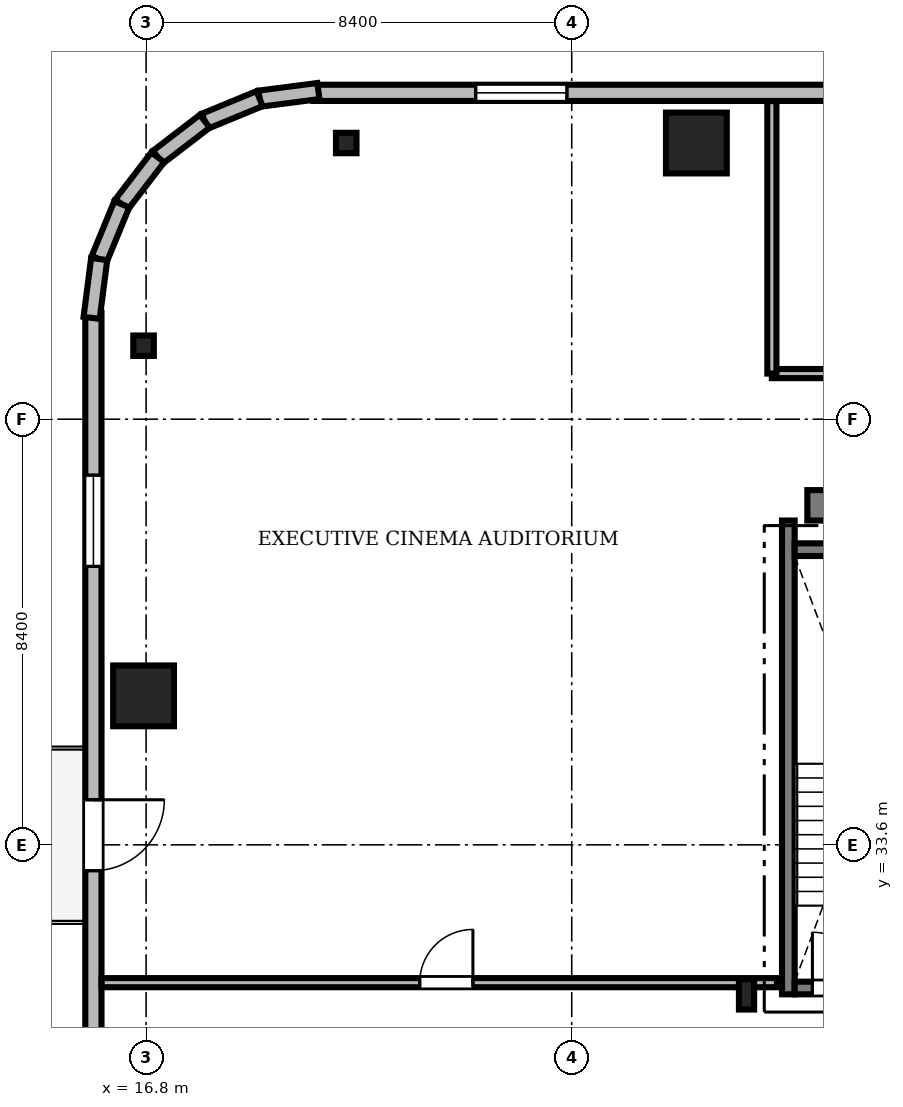
"""IFC4 building model, lengths in metres.
Left out: names, types, materials, properties, quantities, classifications, styles, units other than length and angle.
Written with IfcOpenShell. Run it as: python <this file> out.ifc"""

import sys

from ifc_helpers import new_model, si_unit, direction, frame, frame_2d, origin, origin_2d, place, context, subcontext, project, spatial, rectangle, i_section, extrude, source, transform, mapped, element, fill, save


model = new_model("IFC4")
c1 = context("Model", 3, precision=1e-05, world=origin(), true_north=direction((0.0, 1.0)))
c2 = subcontext(c1, "Body", "Model", "MODEL_VIEW")
j1 = project(units=[si_unit("LENGTHUNIT", "METRE"), si_unit("PLANEANGLEUNIT", "RADIAN")], contexts=[c1])
p1 = place(None, origin())
s1 = spatial("IfcSite", under=j1, at=p1, CompositionType="ELEMENT")
p2 = place(p1, origin())
s2 = spatial("IfcBuilding", under=s1, at=p2, CompositionType="ELEMENT")
p3 = place(p2, frame((0.0, 0.0, 250.6)))
s3 = spatial("IfcBuildingStorey", under=s2, at=p3, CompositionType="ELEMENT", Elevation=250.6)
m1 = source(origin(), c2, "Body", "SweptSolid", [
    extrude(rectangle(XDim=17.52, YDim=0.6, at=frame_2d((8.76, 0.0))), origin(), (0.0, 0.0, 1.0), 3.65),
])
p4 = place(p3, frame((29.85, 40.3, 0.0), z_axis=(0.0, 0.0, 1.0), x_axis=(1.0, 0.0, 0.0)))
e1 = element("IfcWall", 1, at=p4, inside=s3, PredefinedType="SHEAR", context=c2, shape_type="MappedRepresentation", body=[
    mapped(m1, transform((0.0, 0.0, 0.0), scale=1.0)),
])
m2 = source(origin(), c2, "Body", "SweptSolid", [
    extrude(i_section(OverallWidth=0.3, OverallDepth=0.6, WebThickness=0.015, FlangeThickness=0.03, FilletRadius=0.027, at=origin_2d()), origin(), (0.0, 0.0, 1.0), 3.65),
])
p5 = place(p3, frame((28.65, 30.65, 0.0), z_axis=(0.0, 0.0, 1.0), x_axis=(1.0, 0.0, 0.0)))
e2 = element("IfcColumn", 2, at=p5, inside=s3, PredefinedType="COLUMN", context=c2, shape_type="MappedRepresentation", body=[
    mapped(m2, transform((0.0, 0.0, 0.0), scale=1.0)),
])
m3 = source(origin(), c2, "Body", "SweptSolid", [
    extrude(rectangle(XDim=1.2, YDim=1.2, at=origin_2d()), origin(), (0.0, 0.0, 1.0), 3.65),
])
for number, where, z_axis, x_axis in (
    (3, (27.66, 47.45, 0.0), (0.0, 0.0, 1.0), (1.0, 0.0, 0.0)),
    (4, (16.75, 36.54, 0.0), (0.0, 0.0, 1.0), (1.0, 0.0, 0.0)),
):
    element("IfcColumn", number, at=place(p3, frame(where, z_axis=z_axis, x_axis=x_axis)), inside=s3, PredefinedType="COLUMN", context=c2, shape_type="MappedRepresentation", body=[
        mapped(m3, transform((0.0, 0.0, 0.0), scale=1.0)),
    ])
m4 = source(origin(), c2, "Body", "SweptSolid", [
    extrude(i_section(OverallWidth=0.405, OverallDepth=0.403, WebThickness=0.018, FlangeThickness=0.028, FilletRadius=0.015, at=origin_2d()), origin(), (0.0, 0.0, 1.0), 3.65),
])
for number, where, z_axis, x_axis in (
    (5, (20.75, 47.45, 0.0), (0.0, 0.0, 1.0), (1.0, 0.0, 0.0)),
    (6, (16.75, 43.45, 0.0), (0.0, 0.0, 1.0), (1.0, 0.0, 0.0)),
):
    element("IfcColumn", number, at=place(p3, frame(where, z_axis=z_axis, x_axis=x_axis)), inside=s3, PredefinedType="COLUMN", context=c2, shape_type="MappedRepresentation", body=[
        mapped(m4, transform((0.0, 0.0, 0.0), scale=1.0)),
    ])
m5 = source(origin(), c2, "Body", "SweptSolid", [
    extrude(rectangle(XDim=15.6, YDim=0.32, at=frame_2d((7.8, 0.0))), origin(), (0.0, 0.0, 1.0), 3.65),
])
p6 = place(p3, frame((35.7, 48.44, 0.0), z_axis=(0.0, 0.0, 1.0), x_axis=(-1.0, 0.0, 0.0)))
e7 = element("IfcWall", 7, at=p6, inside=s3, PredefinedType="SOLIDWALL", context=c2, shape_type="MappedRepresentation", body=[
    mapped(m5, transform((0.0, 0.0, 0.0), scale=1.0)),
])
m6 = source(origin(), c2, "Body", "SweptSolid", [
    extrude(rectangle(XDim=1.8, YDim=2.4, at=frame_2d((0.9, 1.2))), frame((0.0, 0.17, 0.0), z_axis=(0.0, -1.0, 0.0), x_axis=(1.0, 0.0, 0.0)), (0.0, 0.0, 1.0), 0.34),
])
p7 = place(p6, frame((10.595, 0.0, 0.72)))
e8 = element("IfcOpeningElement", 8, at=p7, cuts=e7, PredefinedType="OPENING", context=c2, shape_type="MappedRepresentation", body=[
    mapped(m6, transform((0.0, 0.0, 0.0), scale=1.0)),
])
m7 = source(origin(), c2, "Body", "SweptSolid", [
    extrude(rectangle(XDim=15.6, YDim=0.32, at=frame_2d((7.8, 0.0))), origin(), (0.0, 0.0, 1.0), 3.65),
])
p8 = place(p3, frame((15.76, 44.1, 0.0), z_axis=(0.0, 0.0, 1.0), x_axis=(0.0, -1.0, 0.0)))
e9 = element("IfcWall", 9, at=p8, inside=s3, PredefinedType="SOLIDWALL", context=c2, shape_type="MappedRepresentation", body=[
    mapped(m7, transform((0.0, 0.0, 0.0), scale=1.0)),
])
m8 = source(origin(), c2, "Body", "SweptSolid", [
    extrude(rectangle(XDim=1.4, YDim=2.3, at=frame_2d((0.7, 1.15))), frame((0.0, 0.17, 0.0), z_axis=(0.0, -1.0, 0.0), x_axis=(1.0, 0.0, 0.0)), (0.0, 0.0, 1.0), 0.34),
])
p9 = place(p8, frame((9.61, 0.0, 0.0)))
e10 = element("IfcOpeningElement", 10, at=p9, cuts=e9, PredefinedType="OPENING", context=c2, shape_type="MappedRepresentation", body=[
    mapped(m8, transform((0.0, 0.0, 0.0), scale=1.0)),
])
p10 = place(p8, frame((3.205, 0.0, 0.72)))
e11 = element("IfcOpeningElement", 11, at=p10, cuts=e9, PredefinedType="OPENING", context=c2, shape_type="MappedRepresentation", body=[
    mapped(m6, transform((0.0, 0.0, 0.0), scale=1.0)),
])
m9 = source(origin(), c2, "Body", "SweptSolid", [
    extrude(rectangle(XDim=1.17, YDim=0.32, at=frame_2d((0.585, 0.0))), origin(), (0.0, 0.0, 1.0), 3.65),
])
p11 = place(p3, frame((20.2, 48.476, 0.0), z_axis=(0.0, 0.0, 1.0), x_axis=(-0.991735963317, -0.128295670475, 0.0)))
e12 = element("IfcWall", 12, at=p11, inside=s3, PredefinedType="SOLIDWALL", context=c2, shape_type="MappedRepresentation", body=[
    mapped(m9, transform((0.0, 0.0, 0.0), scale=1.0)),
])
m10 = source(origin(), c2, "Body", "SweptSolid", [
    extrude(rectangle(XDim=1.169, YDim=0.32, at=frame_2d((0.584, 0.0))), origin(), (0.0, 0.0, 1.0), 3.65),
])
p12 = place(p3, frame((19.04, 48.325, 0.0), z_axis=(0.0, 0.0, 1.0), x_axis=(-0.924552646638, -0.381054331552, 0.0)))
e13 = element("IfcWall", 13, at=p12, inside=s3, PredefinedType="SOLIDWALL", context=c2, shape_type="MappedRepresentation", body=[
    mapped(m10, transform((0.0, 0.0, 0.0), scale=1.0)),
])
m11 = source(origin(), c2, "Body", "SweptSolid", [
    extrude(rectangle(XDim=1.169, YDim=0.32, at=frame_2d((0.584, 0.0))), origin(), (0.0, 0.0, 1.0), 3.65),
])
p13 = place(p3, frame((17.959, 47.88, 0.0), z_axis=(0.0, 0.0, 1.0), x_axis=(-0.793663520347, -0.608356981114, 0.0)))
e14 = element("IfcWall", 14, at=p13, inside=s3, PredefinedType="SOLIDWALL", context=c2, shape_type="MappedRepresentation", body=[
    mapped(m11, transform((0.0, 0.0, 0.0), scale=1.0)),
])
m12 = source(origin(), c2, "Body", "SweptSolid", [
    extrude(rectangle(XDim=1.169, YDim=0.32, at=frame_2d((0.584, 0.0))), origin(), (0.0, 0.0, 1.0), 3.65),
])
p14 = place(p3, frame((17.031, 47.169, 0.0), z_axis=(0.0, 0.0, 1.0), x_axis=(-0.608387696831, -0.793639975269, 0.0)))
e15 = element("IfcWall", 15, at=p14, inside=s3, PredefinedType="SOLIDWALL", context=c2, shape_type="MappedRepresentation", body=[
    mapped(m12, transform((0.0, 0.0, 0.0), scale=1.0)),
])
p15 = place(p3, frame((16.32, 46.241, 0.0), z_axis=(0.0, 0.0, 1.0), x_axis=(-0.381054331552, -0.924552646638, 0.0)))
e16 = element("IfcWall", 16, at=p15, inside=s3, PredefinedType="SOLIDWALL", context=c2, shape_type="MappedRepresentation", body=[
    mapped(m10, transform((0.0, 0.0, 0.0), scale=1.0)),
])
p16 = place(p3, frame((15.875, 45.16, 0.0), z_axis=(0.0, 0.0, 1.0), x_axis=(-0.128295670475, -0.991735963317, 0.0)))
e17 = element("IfcWall", 17, at=p16, inside=s3, PredefinedType="SOLIDWALL", context=c2, shape_type="MappedRepresentation", body=[
    mapped(m9, transform((0.0, 0.0, 0.0), scale=1.0)),
])
m13 = source(origin(), c2, "Body", "SweptSolid", [
    extrude(rectangle(XDim=9.35, YDim=0.25, at=frame_2d((4.675, 0.0))), origin(), (0.0, 0.0, 1.0), 3.75),
])
p17 = place(p3, frame((29.475, 30.65, 0.0), z_axis=(0.0, 0.0, 1.0), x_axis=(0.0, 1.0, 0.0)))
e18 = element("IfcWall", 18, at=p17, inside=s3, PredefinedType="SOLIDWALL", context=c2, shape_type="MappedRepresentation", body=[
    mapped(m13, transform((0.0, 0.0, 0.0), scale=1.0)),
])
m14 = source(origin(), c2, "Body", "SweptSolid", [
    extrude(rectangle(XDim=3.15, YDim=0.25, at=frame_2d((1.575, 0.0))), origin(), (0.0, 0.0, 1.0), 3.75),
])
p18 = place(p3, frame((29.6, 39.425, 0.0), z_axis=(0.0, 0.0, 1.0), x_axis=(1.0, 0.0, 0.0)))
e19 = element("IfcWall", 19, at=p18, inside=s3, PredefinedType="SOLIDWALL", context=c2, shape_type="MappedRepresentation", body=[
    mapped(m14, transform((0.0, 0.0, 0.0), scale=1.0)),
])
p19 = place(p3, frame((29.6, 30.775, 0.0), z_axis=(0.0, 0.0, 1.0), x_axis=(1.0, 0.0, 0.0)))
e20 = element("IfcWall", 20, at=p19, inside=s3, PredefinedType="SOLIDWALL", context=c2, shape_type="MappedRepresentation", body=[
    mapped(m14, transform((0.0, 0.0, 0.0), scale=1.0)),
])
m15 = source(origin(), c2, "Body", "SweptSolid", [
    extrude(rectangle(XDim=1.1, YDim=2.2, at=frame_2d((0.55, 1.1))), frame((0.0, 0.135, 0.0), z_axis=(0.0, -1.0, 0.0), x_axis=(1.0, 0.0, 0.0)), (0.0, 0.0, 1.0), 0.27),
])
p20 = place(p19, frame((0.35, 0.0, 0.0)))
e21 = element("IfcOpeningElement", 21, at=p20, cuts=e20, PredefinedType="OPENING", context=c2, shape_type="MappedRepresentation", body=[
    mapped(m15, transform((0.0, 0.0, 0.0), scale=1.0)),
])
m16 = source(origin(), c2, "Body", "SweptSolid", [
    extrude(rectangle(XDim=32.928, YDim=0.18, at=frame_2d((16.464, 0.0))), origin(), (0.0, 0.0, 1.0), 2.892),
])
p21 = place(p3, frame((29.15, 42.9, 0.0), z_axis=(0.0, 0.0, 1.0), x_axis=(1.0, 0.0, 0.0)))
e22 = element("IfcWall", 22, at=p21, inside=s3, PredefinedType="PARTITIONING", context=c2, shape_type="MappedRepresentation", body=[
    mapped(m16, transform((0.0, 0.0, 0.0), scale=1.0)),
])
m17 = source(origin(), c2, "Body", "SweptSolid", [
    extrude(rectangle(XDim=1.05, YDim=2.2, at=frame_2d((0.525, 1.1))), frame((0.0, 0.1, 0.0), z_axis=(0.0, -1.0, 0.0), x_axis=(1.0, 0.0, 0.0)), (0.0, 0.0, 1.0), 0.2),
])
p22 = place(p21, frame((4.5, 0.0, 0.0)))
e23 = element("IfcOpeningElement", 23, at=p22, cuts=e22, PredefinedType="OPENING", context=c2, shape_type="MappedRepresentation", body=[
    mapped(m17, transform((0.0, 0.0, 0.0), scale=1.0)),
])
m18 = source(origin(), c2, "Body", "SweptSolid", [
    extrude(rectangle(XDim=13.328, YDim=0.18, at=frame_2d((6.664, 0.0))), origin(), (0.0, 0.0, 1.0), 2.892),
])
p23 = place(p3, frame((15.922, 30.88, 0.0), z_axis=(0.0, 0.0, 1.0), x_axis=(1.0, 0.0, 0.0)))
e24 = element("IfcWall", 24, at=p23, inside=s3, PredefinedType="PARTITIONING", context=c2, shape_type="MappedRepresentation", body=[
    mapped(m18, transform((0.0, 0.0, 0.0), scale=1.0)),
])
p24 = place(p23, frame((6.278, 0.0, 0.0)))
e25 = element("IfcOpeningElement", 25, at=p24, cuts=e24, PredefinedType="OPENING", context=c2, shape_type="MappedRepresentation", body=[
    mapped(m17, transform((0.0, 0.0, 0.0), scale=1.0)),
])
m19 = source(origin(), c2, "Body", "SweptSolid", [
    extrude(rectangle(XDim=5.378, YDim=0.18, at=frame_2d((2.689, 0.0))), origin(), (0.0, 0.0, 1.0), 2.892),
])
p25 = place(p3, frame((29.15, 42.9, 0.0), z_axis=(0.0, 0.0, 1.0), x_axis=(0.0, 1.0, 0.0)))
e26 = element("IfcWall", 26, at=p25, inside=s3, PredefinedType="PARTITIONING", context=c2, shape_type="MappedRepresentation", body=[
    mapped(m19, transform((0.0, 0.0, 0.0), scale=1.0)),
])
m20 = source(origin(), c2, "Body", "SweptSolid", [
    extrude(rectangle(XDim=1.8, YDim=2.4, at=frame_2d((0.9, 1.2))), frame((0.0, 0.03, 0.0), z_axis=(0.0, -1.0, 0.0), x_axis=(1.0, 0.0, 0.0)), (0.0, 0.0, 1.0), 0.06),
])
p26 = place(p7, origin())
e27 = element("IfcWindow", 27, at=p26, inside=s3, PartitioningType="SINGLE_PANEL", PredefinedType="WINDOW", context=c2, shape_type="MappedRepresentation", body=[
    mapped(m20, transform((0.0, 0.0, 0.0), scale=1.0)),
])
fill(e8, e27)
m21 = source(origin(), c2, "Body", "SweptSolid", [
    extrude(rectangle(XDim=1.4, YDim=2.3, at=frame_2d((0.7, 1.15))), frame((0.0, 0.025, 0.0), z_axis=(0.0, -1.0, 0.0), x_axis=(1.0, 0.0, 0.0)), (0.0, 0.0, 1.0), 0.05),
])
p27 = place(p9, frame((1.4, 0.0, 0.0), z_axis=(0.0, 0.0, 1.0), x_axis=(-1.0, 0.0, 0.0)))
e28 = element("IfcDoor", 28, at=p27, inside=s3, OperationType="DOUBLE_DOOR_SLIDING", PredefinedType="DOOR", context=c2, shape_type="MappedRepresentation", body=[
    mapped(m21, transform((0.0, 0.0, 0.0), scale=1.0)),
])
fill(e10, e28)
p28 = place(p10, origin())
e29 = element("IfcWindow", 29, at=p28, inside=s3, PartitioningType="SINGLE_PANEL", PredefinedType="WINDOW", context=c2, shape_type="MappedRepresentation", body=[
    mapped(m20, transform((0.0, 0.0, 0.0), scale=1.0)),
])
fill(e11, e29)
m22 = source(origin(), c2, "Body", "SweptSolid", [
    extrude(rectangle(XDim=1.1, YDim=2.2, at=frame_2d((0.55, 1.1))), frame((0.0, 0.025, 0.0), z_axis=(0.0, -1.0, 0.0), x_axis=(1.0, 0.0, 0.0)), (0.0, 0.0, 1.0), 0.05),
])
p29 = place(p20, origin())
e30 = element("IfcDoor", 30, at=p29, inside=s3, OperationType="SINGLE_SWING_LEFT", PredefinedType="DOOR", context=c2, shape_type="MappedRepresentation", body=[
    mapped(m22, transform((0.0, 0.0, 0.0), scale=1.0)),
])
fill(e21, e30)
m23 = source(origin(), c2, "Body", "SweptSolid", [
    extrude(rectangle(XDim=1.05, YDim=2.2, at=frame_2d((0.525, 1.1))), frame((0.0, 0.025, 0.0), z_axis=(0.0, -1.0, 0.0), x_axis=(1.0, 0.0, 0.0)), (0.0, 0.0, 1.0), 0.05),
])
p30 = place(p24, origin())
e31 = element("IfcDoor", 31, at=p30, inside=s3, OperationType="SINGLE_SWING_RIGHT", PredefinedType="DOOR", context=c2, shape_type="MappedRepresentation", body=[
    mapped(m23, transform((0.0, 0.0, 0.0), scale=1.0)),
])
fill(e25, e31)
save(model, sys.argv[1])
